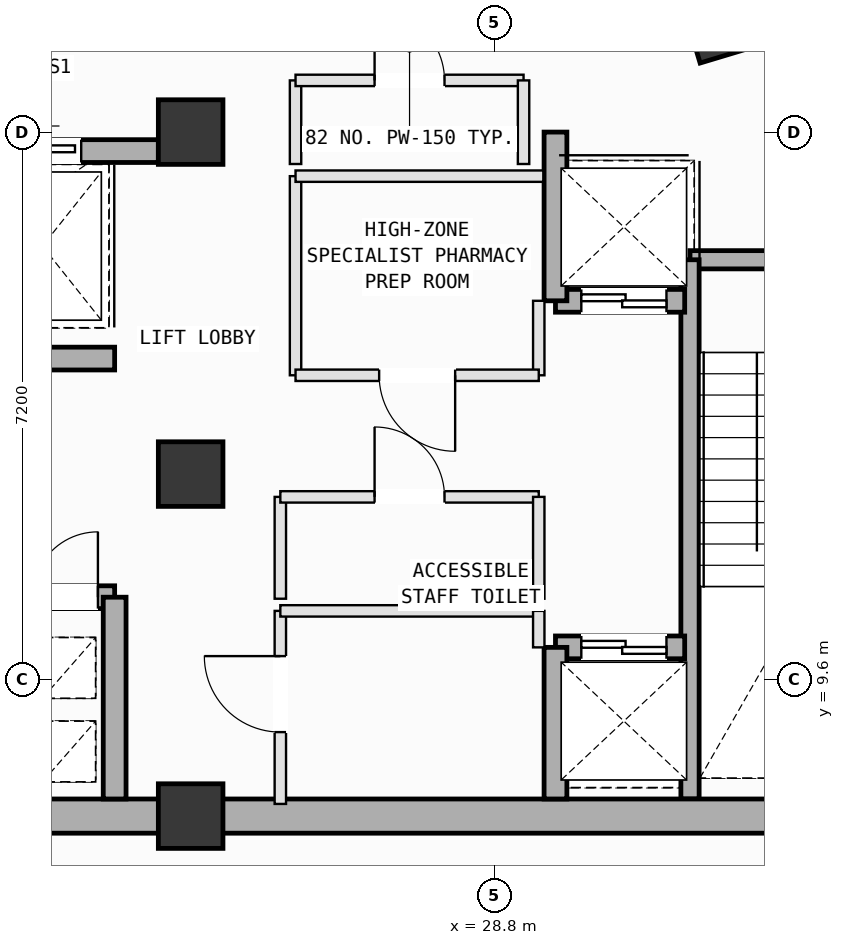
"""IFC4 building model, lengths in metres.
Left out: names, types, materials, properties, quantities, classifications, styles, units other than length and angle.
Written with IfcOpenShell. Run it as: python <this file> out.ifc"""

import sys

from ifc_helpers import new_model, si_unit, direction, frame, frame_2d, origin, origin_2d, place, context, subcontext, project, spatial, rectangle, extrude, element, fill, save


model = new_model("IFC4")
c1 = context("Model", 3, precision=1e-05, world=origin(), true_north=direction((0.0, 1.0)))
c2 = subcontext(c1, "Body", "Model", "MODEL_VIEW")
j1 = project(units=[si_unit("LENGTHUNIT", "METRE"), si_unit("PLANEANGLEUNIT", "RADIAN")], contexts=[c1])
p1 = place(None, origin())
s1 = spatial("IfcSite", under=j1, at=p1, CompositionType="ELEMENT")
p2 = place(p1, origin())
s2 = spatial("IfcBuilding", under=s1, at=p2, CompositionType="ELEMENT")
p3 = place(p2, frame((0.0, 0.0, 288.6)))
s3 = spatial("IfcBuildingStorey", under=s2, at=p3, CompositionType="ELEMENT", Elevation=288.6)
for number, where, z_axis, x_axis in (
    (1, (24.8, 7.8, 0.0), (0.0, 0.0, 1.0), (1.0, 0.0, 0.0)),
    (2, (24.8, 12.3, 0.0), (0.0, 0.0, 1.0), (1.0, 0.0, 0.0)),
    (3, (24.8, 16.8, 0.0), (0.0, 0.0, 1.0), (1.0, 0.0, 0.0)),
):
    element("IfcColumn", number, at=place(p3, frame(where, z_axis=z_axis, x_axis=x_axis)), inside=s3, PredefinedType="COLUMN", context=c2, shape_type="SweptSolid", body=[
        extrude(rectangle(XDim=0.85, YDim=0.85, at=origin_2d()), origin(), (0.0, 0.0, 1.0), 4.0),
    ])
p4 = place(p3, frame((31.37, 15.12, 0.0), z_axis=(0.0, 0.0, 1.0), x_axis=(1.0, 0.0, 0.0)))
e4 = element("IfcWall", 4, at=p4, inside=s3, PredefinedType="SOLIDWALL", context=c2, shape_type="SweptSolid", body=[
    extrude(rectangle(XDim=3.46, YDim=0.24, at=frame_2d((1.73, 0.0))), origin(), (0.0, 0.0, 1.0), 3.78),
])
p5 = place(p4, frame((2.14, 0.0, 0.0)))
e5 = element("IfcOpeningElement", 5, at=p5, cuts=e4, PredefinedType="OPENING", context=c2, shape_type="SweptSolid", body=[
    extrude(rectangle(XDim=1.1, YDim=2.15, at=frame_2d((0.55, 1.075))), frame((0.0, 0.13, 0.0), z_axis=(0.0, -1.0, 0.0), x_axis=(1.0, 0.0, 0.0)), (0.0, 0.0, 1.0), 0.26),
])
p6 = place(p3, frame((31.37, 8.025, 0.0), z_axis=(0.0, 0.0, 1.0), x_axis=(0.0, 1.0, 0.0)))
e6 = element("IfcWall", 6, at=p6, inside=s3, PredefinedType="SOLIDWALL", context=c2, shape_type="SweptSolid", body=[
    extrude(rectangle(XDim=7.095, YDim=0.24, at=frame_2d((3.548, 0.0))), origin(), (0.0, 0.0, 1.0), 3.78),
])
for number, where, z_axis, x_axis in (
    (7, (14.0, 7.8, 0.0), (0.0, 0.0, 1.0), (1.0, 0.0, 0.0)),
    (8, (24.8, 7.8, 0.0), (0.0, 0.0, 1.0), (1.0, 0.0, 0.0)),
):
    element("IfcWall", number, at=place(p3, frame(where, z_axis=z_axis, x_axis=x_axis)), inside=s3, PredefinedType="SHEAR", context=c2, shape_type="SweptSolid", body=[
        extrude(rectangle(XDim=10.8, YDim=0.45, at=frame_2d((5.4, 0.0))), origin(), (0.0, 0.0, 1.0), 3.78),
    ])
p7 = place(p3, frame((19.85, 16.55, 0.0), z_axis=(0.0, 0.0, 1.0), x_axis=(1.0, 0.0, 0.0)))
e9 = element("IfcWall", 9, at=p7, inside=s3, PredefinedType="SOLIDWALL", context=c2, shape_type="SweptSolid", body=[
    extrude(rectangle(XDim=4.525, YDim=0.3, at=frame_2d((2.262, 0.0))), origin(), (0.0, 0.0, 1.0), 3.78),
])
p8 = place(p7, frame((0.475, 0.0, 0.0)))
e10 = element("IfcOpeningElement", 10, at=p8, cuts=e9, PredefinedType="OPENING", context=c2, shape_type="SweptSolid", body=[
    extrude(rectangle(XDim=1.25, YDim=2.18, at=frame_2d((0.625, 1.09))), frame((0.0, 0.16, 0.0), z_axis=(0.0, -1.0, 0.0), x_axis=(1.0, 0.0, 0.0)), (0.0, 0.0, 1.0), 0.32),
])
p9 = place(p7, frame((2.49, 0.0, 0.0)))
e11 = element("IfcOpeningElement", 11, at=p9, cuts=e9, PredefinedType="OPENING", context=c2, shape_type="SweptSolid", body=[
    extrude(rectangle(XDim=1.02, YDim=2.12, at=frame_2d((0.51, 1.06))), frame((0.0, 0.16, 0.0), z_axis=(0.0, -1.0, 0.0), x_axis=(1.0, 0.0, 0.0)), (0.0, 0.0, 1.0), 0.32),
])
p10 = place(p3, frame((18.5, 10.68, 0.0), z_axis=(0.0, 0.0, 1.0), x_axis=(1.0, 0.0, 0.0)))
e12 = element("IfcWall", 12, at=p10, inside=s3, PredefinedType="SOLIDWALL", context=c2, shape_type="SweptSolid", body=[
    extrude(rectangle(XDim=5.3, YDim=0.3, at=frame_2d((2.65, 0.0))), origin(), (0.0, 0.0, 1.0), 3.78),
])
p11 = place(p10, frame((4.22, 0.0, 0.0)))
e13 = element("IfcOpeningElement", 13, at=p11, cuts=e12, PredefinedType="OPENING", context=c2, shape_type="SweptSolid", body=[
    extrude(rectangle(XDim=0.86, YDim=2.06, at=frame_2d((0.43, 1.03))), frame((0.0, 0.16, 0.0), z_axis=(0.0, -1.0, 0.0), x_axis=(1.0, 0.0, 0.0)), (0.0, 0.0, 1.0), 0.32),
])
p12 = place(p10, frame((0.425, 0.0, 0.0)))
e14 = element("IfcOpeningElement", 14, at=p12, cuts=e12, PredefinedType="OPENING", context=c2, shape_type="SweptSolid", body=[
    extrude(rectangle(XDim=1.25, YDim=2.18, at=frame_2d((0.625, 1.09))), frame((0.0, 0.16, 0.0), z_axis=(0.0, -1.0, 0.0), x_axis=(1.0, 0.0, 0.0)), (0.0, 0.0, 1.0), 0.32),
])
p13 = place(p10, frame((2.525, 0.0, 0.0)))
e15 = element("IfcOpeningElement", 15, at=p13, cuts=e12, PredefinedType="OPENING", context=c2, shape_type="SweptSolid", body=[
    extrude(rectangle(XDim=1.25, YDim=2.18, at=frame_2d((0.625, 1.09))), frame((0.0, 0.16, 0.0), z_axis=(0.0, -1.0, 0.0), x_axis=(1.0, 0.0, 0.0)), (0.0, 0.0, 1.0), 0.32),
])
p14 = place(p3, frame((18.5, 13.82, 0.0), z_axis=(0.0, 0.0, 1.0), x_axis=(1.0, 0.0, 0.0)))
e16 = element("IfcWall", 16, at=p14, inside=s3, PredefinedType="SOLIDWALL", context=c2, shape_type="SweptSolid", body=[
    extrude(rectangle(XDim=5.3, YDim=0.3, at=frame_2d((2.65, 0.0))), origin(), (0.0, 0.0, 1.0), 3.78),
])
p15 = place(p14, frame((0.18, 0.0, 0.0)))
e17 = element("IfcOpeningElement", 17, at=p15, cuts=e16, PredefinedType="OPENING", context=c2, shape_type="SweptSolid", body=[
    extrude(rectangle(XDim=1.1, YDim=2.15, at=frame_2d((0.55, 1.075))), frame((0.0, 0.16, 0.0), z_axis=(0.0, -1.0, 0.0), x_axis=(1.0, 0.0, 0.0)), (0.0, 0.0, 1.0), 0.32),
])
p16 = place(p3, frame((23.8, 8.025, 0.0), z_axis=(0.0, 0.0, 1.0), x_axis=(0.0, 1.0, 0.0)))
e18 = element("IfcWall", 18, at=p16, inside=s3, PredefinedType="SOLIDWALL", context=c2, shape_type="SweptSolid", body=[
    extrude(rectangle(XDim=2.655, YDim=0.3, at=frame_2d((1.328, 0.0))), origin(), (0.0, 0.0, 1.0), 3.78),
])
p17 = place(p3, frame((29.6, 10.02, 0.0), z_axis=(0.0, 0.0, 1.0), x_axis=(1.0, 0.0, 0.0)))
e19 = element("IfcWall", 19, at=p17, inside=s3, PredefinedType="SOLIDWALL", context=c2, shape_type="SweptSolid", body=[
    extrude(rectangle(XDim=1.7, YDim=0.3, at=frame_2d((0.85, 0.0))), origin(), (0.0, 0.0, 1.0), 3.78),
])
p18 = place(p17, frame((0.34, 0.0, 0.0)))
e20 = element("IfcOpeningElement", 20, at=p18, cuts=e19, PredefinedType="OPENING", context=c2, shape_type="SweptSolid", body=[
    extrude(rectangle(XDim=1.12, YDim=2.15, at=frame_2d((0.56, 1.075))), frame((0.0, 0.16, 0.0), z_axis=(0.0, -1.0, 0.0), x_axis=(1.0, 0.0, 0.0)), (0.0, 0.0, 1.0), 0.32),
])
p19 = place(p3, frame((29.6, 8.025, 0.0), z_axis=(0.0, 0.0, 1.0), x_axis=(0.0, 1.0, 0.0)))
e21 = element("IfcWall", 21, at=p19, inside=s3, PredefinedType="SOLIDWALL", context=c2, shape_type="SweptSolid", body=[
    extrude(rectangle(XDim=1.995, YDim=0.3, at=frame_2d((0.998, 0.0))), origin(), (0.0, 0.0, 1.0), 3.78),
])
p20 = place(p3, frame((29.6, 14.58, 0.0), z_axis=(0.0, 0.0, 1.0), x_axis=(1.0, 0.0, 0.0)))
e22 = element("IfcWall", 22, at=p20, inside=s3, PredefinedType="SOLIDWALL", context=c2, shape_type="SweptSolid", body=[
    extrude(rectangle(XDim=1.7, YDim=0.3, at=frame_2d((0.85, 0.0))), origin(), (0.0, 0.0, 1.0), 3.78),
])
p21 = place(p20, frame((0.34, 0.0, 0.0)))
e23 = element("IfcOpeningElement", 23, at=p21, cuts=e22, PredefinedType="OPENING", context=c2, shape_type="SweptSolid", body=[
    extrude(rectangle(XDim=1.12, YDim=2.15, at=frame_2d((0.56, 1.075))), frame((0.0, 0.16, 0.0), z_axis=(0.0, -1.0, 0.0), x_axis=(1.0, 0.0, 0.0)), (0.0, 0.0, 1.0), 0.32),
])
p22 = place(p3, frame((29.6, 14.58, 0.0), z_axis=(0.0, 0.0, 1.0), x_axis=(0.0, 1.0, 0.0)))
e24 = element("IfcWall", 24, at=p22, inside=s3, PredefinedType="SOLIDWALL", context=c2, shape_type="SweptSolid", body=[
    extrude(rectangle(XDim=2.22, YDim=0.3, at=frame_2d((1.11, 0.0))), origin(), (0.0, 0.0, 1.0), 3.78),
])
p23 = place(p3, frame((25.98, 7.96, 0.0), z_axis=(0.0, 0.0, 1.0), x_axis=(0.0, 1.0, 0.0)))
e25 = element("IfcWall", 25, at=p23, inside=s3, PredefinedType="PARTITIONING", context=c2, shape_type="SweptSolid", body=[
    extrude(rectangle(XDim=2.54, YDim=0.15, at=frame_2d((1.27, 0.0))), origin(), (0.0, 0.0, 1.0), 3.78),
])
p24 = place(p23, frame((0.945, 0.0, 0.0)))
e26 = element("IfcOpeningElement", 26, at=p24, cuts=e25, PredefinedType="OPENING", context=c2, shape_type="SweptSolid", body=[
    extrude(rectangle(XDim=1.0, YDim=2.12, at=frame_2d((0.5, 1.06))), frame((0.0, 0.085, 0.0), z_axis=(0.0, -1.0, 0.0), x_axis=(1.0, 0.0, 0.0)), (0.0, 0.0, 1.0), 0.17),
])
p25 = place(p3, frame((25.98, 10.5, 0.0), z_axis=(0.0, 0.0, 1.0), x_axis=(1.0, 0.0, 0.0)))
e27 = element("IfcWall", 27, at=p25, inside=s3, PredefinedType="PARTITIONING", context=c2, shape_type="SweptSolid", body=[
    extrude(rectangle(XDim=3.4, YDim=0.15, at=frame_2d((1.7, 0.0))), origin(), (0.0, 0.0, 1.0), 3.78),
])
p26 = place(p3, frame((29.38, 10.5, 0.0), z_axis=(0.0, 0.0, 1.0), x_axis=(0.0, -1.0, 0.0)))
e28 = element("IfcWall", 28, at=p26, inside=s3, PredefinedType="PARTITIONING", context=c2, shape_type="SweptSolid", body=[
    extrude(rectangle(XDim=0.48, YDim=0.15, at=frame_2d((0.24, 0.0))), origin(), (0.0, 0.0, 1.0), 3.78),
])
p27 = place(p3, frame((25.98, 10.66, 0.0), z_axis=(0.0, 0.0, 1.0), x_axis=(0.0, 1.0, 0.0)))
e29 = element("IfcWall", 29, at=p27, inside=s3, PredefinedType="PARTITIONING", context=c2, shape_type="SweptSolid", body=[
    extrude(rectangle(XDim=1.34, YDim=0.15, at=frame_2d((0.67, 0.0))), origin(), (0.0, 0.0, 1.0), 3.78),
])
p28 = place(p3, frame((25.98, 12.0, 0.0), z_axis=(0.0, 0.0, 1.0), x_axis=(1.0, 0.0, 0.0)))
e30 = element("IfcWall", 30, at=p28, inside=s3, PredefinedType="PARTITIONING", context=c2, shape_type="SweptSolid", body=[
    extrude(rectangle(XDim=3.4, YDim=0.15, at=frame_2d((1.7, 0.0))), origin(), (0.0, 0.0, 1.0), 3.78),
])
p29 = place(p28, frame((1.24, 0.0, 0.0)))
e31 = element("IfcOpeningElement", 31, at=p29, cuts=e30, PredefinedType="OPENING", context=c2, shape_type="SweptSolid", body=[
    extrude(rectangle(XDim=0.92, YDim=2.1, at=frame_2d((0.46, 1.05))), frame((0.0, 0.085, 0.0), z_axis=(0.0, -1.0, 0.0), x_axis=(1.0, 0.0, 0.0)), (0.0, 0.0, 1.0), 0.17),
])
p30 = place(p3, frame((29.38, 12.0, 0.0), z_axis=(0.0, 0.0, 1.0), x_axis=(0.0, -1.0, 0.0)))
e32 = element("IfcWall", 32, at=p30, inside=s3, PredefinedType="PARTITIONING", context=c2, shape_type="SweptSolid", body=[
    extrude(rectangle(XDim=1.34, YDim=0.15, at=frame_2d((0.67, 0.0))), origin(), (0.0, 0.0, 1.0), 3.78),
])
p31 = place(p3, frame((26.18, 13.6, 0.0), z_axis=(0.0, 0.0, 1.0), x_axis=(0.0, 1.0, 0.0)))
e33 = element("IfcWall", 33, at=p31, inside=s3, PredefinedType="PARTITIONING", context=c2, shape_type="SweptSolid", body=[
    extrude(rectangle(XDim=2.62, YDim=0.15, at=frame_2d((1.31, 0.0))), origin(), (0.0, 0.0, 1.0), 3.78),
])
p32 = place(p3, frame((26.18, 16.22, 0.0), z_axis=(0.0, 0.0, 1.0), x_axis=(1.0, 0.0, 0.0)))
e34 = element("IfcWall", 34, at=p32, inside=s3, PredefinedType="PARTITIONING", context=c2, shape_type="SweptSolid", body=[
    extrude(rectangle(XDim=3.26, YDim=0.15, at=frame_2d((1.63, 0.0))), origin(), (0.0, 0.0, 1.0), 3.78),
])
p33 = place(p3, frame((29.38, 14.58, 0.0), z_axis=(0.0, 0.0, 1.0), x_axis=(0.0, -1.0, 0.0)))
e35 = element("IfcWall", 35, at=p33, inside=s3, PredefinedType="PARTITIONING", context=c2, shape_type="SweptSolid", body=[
    extrude(rectangle(XDim=0.98, YDim=0.15, at=frame_2d((0.49, 0.0))), origin(), (0.0, 0.0, 1.0), 3.78),
])
p34 = place(p3, frame((29.38, 13.6, 0.0), z_axis=(0.0, 0.0, 1.0), x_axis=(-1.0, 0.0, 0.0)))
e36 = element("IfcWall", 36, at=p34, inside=s3, PredefinedType="PARTITIONING", context=c2, shape_type="SweptSolid", body=[
    extrude(rectangle(XDim=3.2, YDim=0.15, at=frame_2d((1.6, 0.0))), origin(), (0.0, 0.0, 1.0), 3.78),
])
p35 = place(p34, frame((1.1, 0.0, 0.0)))
e37 = element("IfcOpeningElement", 37, at=p35, cuts=e36, PredefinedType="OPENING", context=c2, shape_type="SweptSolid", body=[
    extrude(rectangle(XDim=1.0, YDim=2.12, at=frame_2d((0.5, 1.06))), frame((0.0, 0.085, 0.0), z_axis=(0.0, -1.0, 0.0), x_axis=(1.0, 0.0, 0.0)), (0.0, 0.0, 1.0), 0.17),
])
p36 = place(p3, frame((26.18, 16.38, 0.0), z_axis=(0.0, 0.0, 1.0), x_axis=(0.0, 1.0, 0.0)))
e38 = element("IfcWall", 38, at=p36, inside=s3, PredefinedType="PARTITIONING", context=c2, shape_type="SweptSolid", body=[
    extrude(rectangle(XDim=1.1, YDim=0.15, at=frame_2d((0.55, 0.0))), origin(), (0.0, 0.0, 1.0), 3.78),
])
p37 = place(p3, frame((26.18, 17.48, 0.0), z_axis=(0.0, 0.0, 1.0), x_axis=(1.0, 0.0, 0.0)))
e39 = element("IfcWall", 39, at=p37, inside=s3, PredefinedType="PARTITIONING", context=c2, shape_type="SweptSolid", body=[
    extrude(rectangle(XDim=3.0, YDim=0.15, at=frame_2d((1.5, 0.0))), origin(), (0.0, 0.0, 1.0), 3.78),
])
p38 = place(p37, frame((1.04, 0.0, 0.0)))
e40 = element("IfcOpeningElement", 40, at=p38, cuts=e39, PredefinedType="OPENING", context=c2, shape_type="SweptSolid", body=[
    extrude(rectangle(XDim=0.92, YDim=2.1, at=frame_2d((0.46, 1.05))), frame((0.0, 0.085, 0.0), z_axis=(0.0, -1.0, 0.0), x_axis=(1.0, 0.0, 0.0)), (0.0, 0.0, 1.0), 0.17),
])
p39 = place(p3, frame((29.18, 17.48, 0.0), z_axis=(0.0, 0.0, 1.0), x_axis=(0.0, -1.0, 0.0)))
e41 = element("IfcWall", 41, at=p39, inside=s3, PredefinedType="PARTITIONING", context=c2, shape_type="SweptSolid", body=[
    extrude(rectangle(XDim=1.1, YDim=0.15, at=frame_2d((0.55, 0.0))), origin(), (0.0, 0.0, 1.0), 3.78),
])
p40 = place(p11, origin())
e42 = element("IfcDoor", 42, at=p40, inside=s3, OperationType="SINGLE_SWING_RIGHT", PredefinedType="DOOR", context=c2, shape_type="SweptSolid", body=[
    extrude(rectangle(XDim=0.86, YDim=2.06, at=frame_2d((0.43, 1.03))), frame((0.0, 0.025, 0.0), z_axis=(0.0, -1.0, 0.0), x_axis=(1.0, 0.0, 0.0)), (0.0, 0.0, 1.0), 0.05),
])
fill(e13, e42)
p41 = place(p18, origin())
e43 = element("IfcDoor", 43, at=p41, inside=s3, OperationType="DOUBLE_DOOR_SLIDING", PredefinedType="DOOR", context=c2, shape_type="SweptSolid", body=[
    extrude(rectangle(XDim=1.12, YDim=2.15, at=frame_2d((0.56, 1.075))), frame((0.0, 0.025, 0.0), z_axis=(0.0, -1.0, 0.0), x_axis=(1.0, 0.0, 0.0)), (0.0, 0.0, 1.0), 0.05),
])
fill(e20, e43)
p42 = place(p21, origin())
e44 = element("IfcDoor", 44, at=p42, inside=s3, OperationType="DOUBLE_DOOR_SLIDING", PredefinedType="DOOR", context=c2, shape_type="SweptSolid", body=[
    extrude(rectangle(XDim=1.12, YDim=2.15, at=frame_2d((0.56, 1.075))), frame((0.0, 0.025, 0.0), z_axis=(0.0, -1.0, 0.0), x_axis=(1.0, 0.0, 0.0)), (0.0, 0.0, 1.0), 0.05),
])
fill(e23, e44)
p43 = place(p9, origin())
e45 = element("IfcDoor", 45, at=p43, inside=s3, OperationType="SLIDING_TO_LEFT", PredefinedType="DOOR", context=c2, shape_type="SweptSolid", body=[
    extrude(rectangle(XDim=1.02, YDim=2.12, at=frame_2d((0.51, 1.06))), frame((0.0, 0.025, 0.0), z_axis=(0.0, -1.0, 0.0), x_axis=(1.0, 0.0, 0.0)), (0.0, 0.0, 1.0), 0.05),
])
fill(e11, e45)
p44 = place(p24, origin())
e46 = element("IfcDoor", 46, at=p44, inside=s3, OperationType="SINGLE_SWING_RIGHT", PredefinedType="DOOR", context=c2, shape_type="SweptSolid", body=[
    extrude(rectangle(XDim=1.0, YDim=2.12, at=frame_2d((0.5, 1.06))), frame((0.0, 0.025, 0.0), z_axis=(0.0, -1.0, 0.0), x_axis=(1.0, 0.0, 0.0)), (0.0, 0.0, 1.0), 0.05),
])
fill(e26, e46)
p45 = place(p29, origin())
e47 = element("IfcDoor", 47, at=p45, inside=s3, OperationType="SINGLE_SWING_LEFT", PredefinedType="DOOR", context=c2, shape_type="SweptSolid", body=[
    extrude(rectangle(XDim=0.92, YDim=2.1, at=frame_2d((0.46, 1.05))), frame((0.0, 0.025, 0.0), z_axis=(0.0, -1.0, 0.0), x_axis=(1.0, 0.0, 0.0)), (0.0, 0.0, 1.0), 0.05),
])
fill(e31, e47)
p46 = place(p35, origin())
e48 = element("IfcDoor", 48, at=p46, inside=s3, OperationType="SINGLE_SWING_LEFT", PredefinedType="DOOR", context=c2, shape_type="SweptSolid", body=[
    extrude(rectangle(XDim=1.0, YDim=2.12, at=frame_2d((0.5, 1.06))), frame((0.0, 0.025, 0.0), z_axis=(0.0, -1.0, 0.0), x_axis=(1.0, 0.0, 0.0)), (0.0, 0.0, 1.0), 0.05),
])
fill(e37, e48)
p47 = place(p38, origin())
e49 = element("IfcDoor", 49, at=p47, inside=s3, OperationType="SINGLE_SWING_LEFT", PredefinedType="DOOR", context=c2, shape_type="SweptSolid", body=[
    extrude(rectangle(XDim=0.92, YDim=2.1, at=frame_2d((0.46, 1.05))), frame((0.0, 0.025, 0.0), z_axis=(0.0, -1.0, 0.0), x_axis=(1.0, 0.0, 0.0)), (0.0, 0.0, 1.0), 0.05),
])
fill(e40, e49)
save(model, sys.argv[1])
